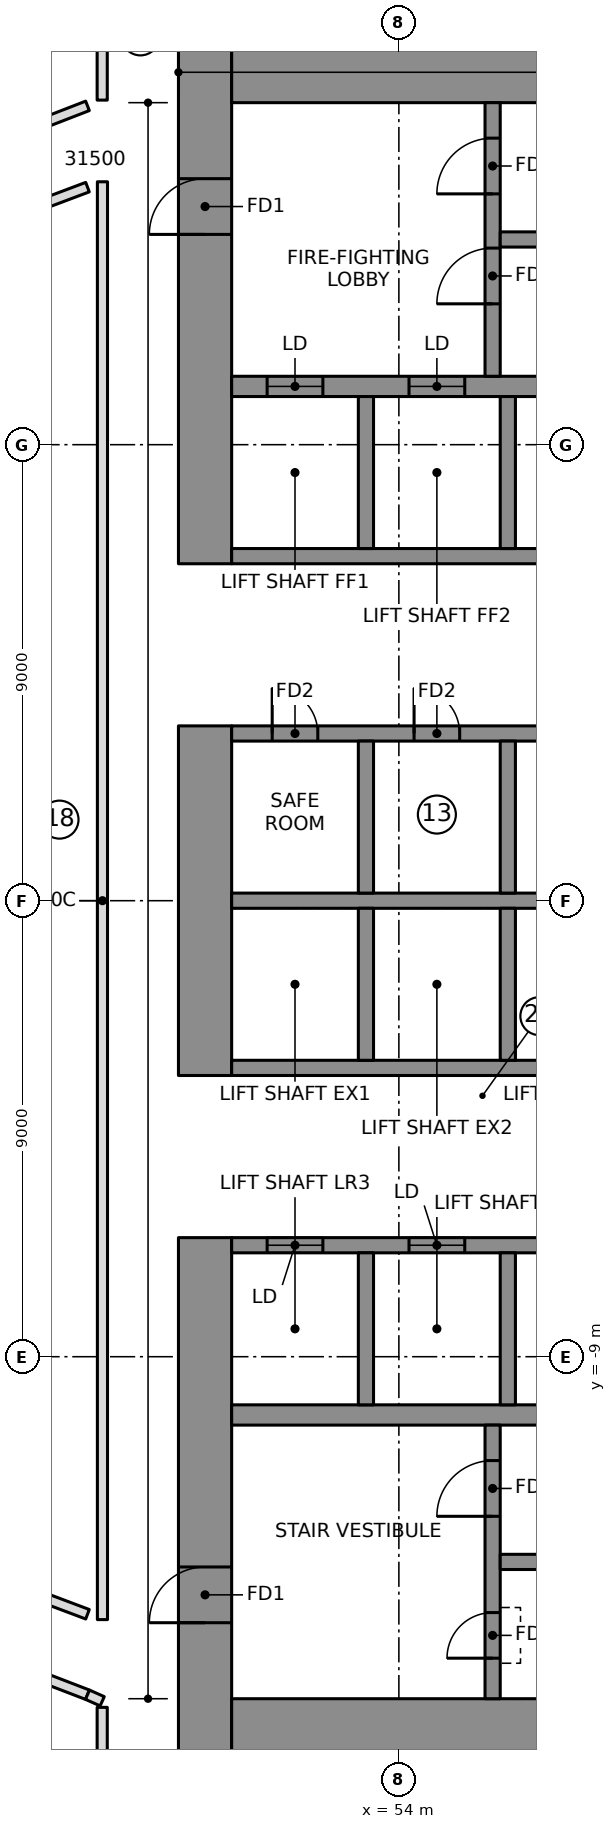
"""IFC4 building model, lengths in metres.
Left out: names, types, materials, properties, quantities, classifications, styles, units other than length and angle.
Written with IfcOpenShell. Run it as: python <this file> out.ifc"""

import sys

from ifc_helpers import new_model, si_unit, direction, frame, frame_2d, origin, place, context, subcontext, project, spatial, rectangle, extrude, element, fill, save


model = new_model("IFC4")
c1 = context("Model", 3, precision=1e-05, world=origin(), true_north=direction((0.0, 1.0)))
c2 = subcontext(c1, "Body", "Model", "MODEL_VIEW")
j1 = project(units=[si_unit("LENGTHUNIT", "METRE"), si_unit("PLANEANGLEUNIT", "RADIAN")], contexts=[c1])
p1 = place(None, origin())
s1 = spatial("IfcSite", under=j1, at=p1, CompositionType="ELEMENT")
p2 = place(p1, origin())
s2 = spatial("IfcBuilding", under=s1, at=p2, CompositionType="ELEMENT")
p3 = place(p2, frame((0.0, 0.0, 84.9)))
s3 = spatial("IfcBuildingStorey", under=s2, at=p3, CompositionType="ELEMENT", Elevation=84.9)
p4 = place(p3, frame((50.175, 6.65, 0.0), z_axis=(0.0, 0.0, 1.0), x_axis=(0.0, 1.0, 0.0)))
e1 = element("IfcWall", 1, at=p4, inside=s3, PredefinedType="SHEAR", context=c2, shape_type="SweptSolid", body=[
    extrude(rectangle(XDim=10.15, YDim=1.05, at=frame_2d((5.075, 0.0))), origin(), (0.0, 0.0, 1.0), 3.55),
])
p5 = place(p4, frame((6.5, 0.0, 0.0)))
e2 = element("IfcOpeningElement", 2, at=p5, cuts=e1, PredefinedType="OPENING", context=c2, shape_type="SweptSolid", body=[
    extrude(rectangle(XDim=1.1, YDim=2.1, at=frame_2d((0.55, 1.05))), frame((0.0, 0.535, 0.0), z_axis=(0.0, -1.0, 0.0), x_axis=(1.0, 0.0, 0.0)), (0.0, 0.0, 1.0), 1.07),
])
p6 = place(p3, frame((50.175, -3.45, 0.0), z_axis=(0.0, 0.0, 1.0), x_axis=(0.0, 1.0, 0.0)))
e3 = element("IfcWall", 3, at=p6, inside=s3, PredefinedType="SHEAR", context=c2, shape_type="SweptSolid", body=[
    extrude(rectangle(XDim=6.9, YDim=1.05, at=frame_2d((3.45, 0.0))), origin(), (0.0, 0.0, 1.0), 3.55),
])
p7 = place(p3, frame((50.175, -16.8, 0.0), z_axis=(0.0, 0.0, 1.0), x_axis=(0.0, 1.0, 0.0)))
e4 = element("IfcWall", 4, at=p7, inside=s3, PredefinedType="SHEAR", context=c2, shape_type="SweptSolid", body=[
    extrude(rectangle(XDim=10.15, YDim=1.05, at=frame_2d((5.075, 0.0))), origin(), (0.0, 0.0, 1.0), 3.55),
])
p8 = place(p7, frame((2.55, 0.0, 0.0)))
e5 = element("IfcOpeningElement", 5, at=p8, cuts=e4, PredefinedType="OPENING", context=c2, shape_type="SweptSolid", body=[
    extrude(rectangle(XDim=1.1, YDim=2.1, at=frame_2d((0.55, 1.05))), frame((0.0, 0.535, 0.0), z_axis=(0.0, -1.0, 0.0), x_axis=(1.0, 0.0, 0.0)), (0.0, 0.0, 1.0), 1.07),
])
for number, where, z_axis, x_axis in (
    (6, (50.7, 16.275, 0.0), (0.0, 0.0, 1.0), (1.0, 0.0, 0.0)),
    (7, (50.7, -16.275, 0.0), (0.0, 0.0, 1.0), (1.0, 0.0, 0.0)),
):
    element("IfcWall", number, at=place(p3, frame(where, z_axis=z_axis, x_axis=x_axis)), inside=s3, PredefinedType="SHEAR", context=c2, shape_type="SweptSolid", body=[
        extrude(rectangle(XDim=14.07, YDim=1.05, at=frame_2d((7.035, 0.0))), origin(), (0.0, 0.0, 1.0), 3.55),
    ])
p9 = place(p3, frame((50.7, 10.15, 0.0), z_axis=(0.0, 0.0, 1.0), x_axis=(1.0, 0.0, 0.0)))
e8 = element("IfcWall", 8, at=p9, inside=s3, PredefinedType="SHEAR", context=c2, shape_type="SweptSolid", body=[
    extrude(rectangle(XDim=13.02, YDim=0.4, at=frame_2d((6.51, 0.0))), origin(), (0.0, 0.0, 1.0), 3.55),
])
p10 = place(p9, frame((0.7, 0.0, 0.0)))
e9 = element("IfcOpeningElement", 9, at=p10, cuts=e8, PredefinedType="OPENING", context=c2, shape_type="SweptSolid", body=[
    extrude(rectangle(XDim=1.1, YDim=2.1, at=frame_2d((0.55, 1.05))), frame((0.0, 0.21, 0.0), z_axis=(0.0, -1.0, 0.0), x_axis=(1.0, 0.0, 0.0)), (0.0, 0.0, 1.0), 0.42),
])
p11 = place(p9, frame((3.5, 0.0, 0.0)))
e10 = element("IfcOpeningElement", 10, at=p11, cuts=e8, PredefinedType="OPENING", context=c2, shape_type="SweptSolid", body=[
    extrude(rectangle(XDim=1.1, YDim=2.1, at=frame_2d((0.55, 1.05))), frame((0.0, 0.21, 0.0), z_axis=(0.0, -1.0, 0.0), x_axis=(1.0, 0.0, 0.0)), (0.0, 0.0, 1.0), 0.42),
])
p12 = place(p3, frame((50.7, -10.15, 0.0), z_axis=(0.0, 0.0, 1.0), x_axis=(1.0, 0.0, 0.0)))
e11 = element("IfcWall", 11, at=p12, inside=s3, PredefinedType="SHEAR", context=c2, shape_type="SweptSolid", body=[
    extrude(rectangle(XDim=13.02, YDim=0.4, at=frame_2d((6.51, 0.0))), origin(), (0.0, 0.0, 1.0), 3.55),
])
p13 = place(p3, frame((50.7, 0.0, 0.0), z_axis=(0.0, 0.0, 1.0), x_axis=(1.0, 0.0, 0.0)))
e12 = element("IfcWall", 12, at=p13, inside=s3, PredefinedType="SHEAR", context=c2, shape_type="SweptSolid", body=[
    extrude(rectangle(XDim=10.9, YDim=0.3, at=frame_2d((5.45, 0.0))), origin(), (0.0, 0.0, 1.0), 3.55),
])
p14 = place(p3, frame((50.7, 3.3, 0.0), z_axis=(0.0, 0.0, 1.0), x_axis=(1.0, 0.0, 0.0)))
e13 = element("IfcWall", 13, at=p14, inside=s3, PredefinedType="SHEAR", context=c2, shape_type="SweptSolid", body=[
    extrude(rectangle(XDim=10.9, YDim=0.3, at=frame_2d((5.45, 0.0))), origin(), (0.0, 0.0, 1.0), 3.55),
])
p15 = place(p14, frame((0.8, 0.0, 0.0)))
e14 = element("IfcOpeningElement", 14, at=p15, cuts=e13, PredefinedType="OPENING", context=c2, shape_type="SweptSolid", body=[
    extrude(rectangle(XDim=0.9, YDim=2.1, at=frame_2d((0.45, 1.05))), frame((0.0, 0.16, 0.0), z_axis=(0.0, -1.0, 0.0), x_axis=(1.0, 0.0, 0.0)), (0.0, 0.0, 1.0), 0.32),
])
p16 = place(p14, frame((3.6, 0.0, 0.0)))
e15 = element("IfcOpeningElement", 15, at=p16, cuts=e13, PredefinedType="OPENING", context=c2, shape_type="SweptSolid", body=[
    extrude(rectangle(XDim=0.9, YDim=2.1, at=frame_2d((0.45, 1.05))), frame((0.0, 0.16, 0.0), z_axis=(0.0, -1.0, 0.0), x_axis=(1.0, 0.0, 0.0)), (0.0, 0.0, 1.0), 0.32),
])
p17 = place(p14, frame((6.4, 0.0, 0.0)))
e16 = element("IfcOpeningElement", 16, at=p17, cuts=e13, PredefinedType="OPENING", context=c2, shape_type="SweptSolid", body=[
    extrude(rectangle(XDim=0.9, YDim=2.1, at=frame_2d((0.45, 1.05))), frame((0.0, 0.16, 0.0), z_axis=(0.0, -1.0, 0.0), x_axis=(1.0, 0.0, 0.0)), (0.0, 0.0, 1.0), 0.32),
])
p18 = place(p14, frame((9.2, 0.0, 0.0)))
e17 = element("IfcOpeningElement", 17, at=p18, cuts=e13, PredefinedType="OPENING", context=c2, shape_type="SweptSolid", body=[
    extrude(rectangle(XDim=0.9, YDim=2.1, at=frame_2d((0.45, 1.05))), frame((0.0, 0.16, 0.0), z_axis=(0.0, -1.0, 0.0), x_axis=(1.0, 0.0, 0.0)), (0.0, 0.0, 1.0), 0.32),
])
p19 = place(p3, frame((50.7, 6.8, 0.0), z_axis=(0.0, 0.0, 1.0), x_axis=(1.0, 0.0, 0.0)))
e18 = element("IfcWall", 18, at=p19, inside=s3, PredefinedType="SHEAR", context=c2, shape_type="SweptSolid", body=[
    extrude(rectangle(XDim=10.9, YDim=0.3, at=frame_2d((5.45, 0.0))), origin(), (0.0, 0.0, 1.0), 3.55),
])
p20 = place(p19, frame((6.3, 0.0, 0.0)))
e19 = element("IfcOpeningElement", 19, at=p20, cuts=e18, PredefinedType="OPENING", context=c2, shape_type="SweptSolid", body=[
    extrude(rectangle(XDim=1.1, YDim=2.1, at=frame_2d((0.55, 1.05))), frame((0.0, 0.16, 0.0), z_axis=(0.0, -1.0, 0.0), x_axis=(1.0, 0.0, 0.0)), (0.0, 0.0, 1.0), 0.32),
])
p21 = place(p19, frame((9.1, 0.0, 0.0)))
e20 = element("IfcOpeningElement", 20, at=p21, cuts=e18, PredefinedType="OPENING", context=c2, shape_type="SweptSolid", body=[
    extrude(rectangle(XDim=1.1, YDim=2.1, at=frame_2d((0.55, 1.05))), frame((0.0, 0.16, 0.0), z_axis=(0.0, -1.0, 0.0), x_axis=(1.0, 0.0, 0.0)), (0.0, 0.0, 1.0), 0.32),
])
for number, where, z_axis, x_axis in (
    (21, (53.35, 0.15, 0.0), (0.0, 0.0, 1.0), (0.0, 1.0, 0.0)),
    (22, (53.35, 6.95, 0.0), (0.0, 0.0, 1.0), (0.0, 1.0, 0.0)),
    (23, (56.15, 0.15, 0.0), (0.0, 0.0, 1.0), (0.0, 1.0, 0.0)),
    (24, (56.15, 6.95, 0.0), (0.0, 0.0, 1.0), (0.0, 1.0, 0.0)),
):
    element("IfcWall", number, at=place(p3, frame(where, z_axis=z_axis, x_axis=x_axis)), inside=s3, PredefinedType="SHEAR", context=c2, shape_type="SweptSolid", body=[
        extrude(rectangle(XDim=3.0, YDim=0.3, at=frame_2d((1.5, 0.0))), origin(), (0.0, 0.0, 1.0), 3.55),
    ])
p22 = place(p3, frame((50.7, -3.3, 0.0), z_axis=(0.0, 0.0, 1.0), x_axis=(1.0, 0.0, 0.0)))
e25 = element("IfcWall", 25, at=p22, inside=s3, PredefinedType="SHEAR", context=c2, shape_type="SweptSolid", body=[
    extrude(rectangle(XDim=10.9, YDim=0.3, at=frame_2d((5.45, 0.0))), origin(), (0.0, 0.0, 1.0), 3.55),
])
p23 = place(p22, frame((9.2, 0.0, 0.0)))
e26 = element("IfcOpeningElement", 26, at=p23, cuts=e25, PredefinedType="OPENING", context=c2, shape_type="SweptSolid", body=[
    extrude(rectangle(XDim=0.9, YDim=2.1, at=frame_2d((0.45, 1.05))), frame((0.0, 0.16, 0.0), z_axis=(0.0, -1.0, 0.0), x_axis=(1.0, 0.0, 0.0)), (0.0, 0.0, 1.0), 0.32),
])
p24 = place(p3, frame((50.7, -6.8, 0.0), z_axis=(0.0, 0.0, 1.0), x_axis=(1.0, 0.0, 0.0)))
e27 = element("IfcWall", 27, at=p24, inside=s3, PredefinedType="SHEAR", context=c2, shape_type="SweptSolid", body=[
    extrude(rectangle(XDim=10.9, YDim=0.3, at=frame_2d((5.45, 0.0))), origin(), (0.0, 0.0, 1.0), 3.55),
])
p25 = place(p24, frame((0.7, 0.0, 0.0)))
e28 = element("IfcOpeningElement", 28, at=p25, cuts=e27, PredefinedType="OPENING", context=c2, shape_type="SweptSolid", body=[
    extrude(rectangle(XDim=1.1, YDim=2.1, at=frame_2d((0.55, 1.05))), frame((0.0, 0.16, 0.0), z_axis=(0.0, -1.0, 0.0), x_axis=(1.0, 0.0, 0.0)), (0.0, 0.0, 1.0), 0.32),
])
p26 = place(p24, frame((3.5, 0.0, 0.0)))
e29 = element("IfcOpeningElement", 29, at=p26, cuts=e27, PredefinedType="OPENING", context=c2, shape_type="SweptSolid", body=[
    extrude(rectangle(XDim=1.1, YDim=2.1, at=frame_2d((0.55, 1.05))), frame((0.0, 0.16, 0.0), z_axis=(0.0, -1.0, 0.0), x_axis=(1.0, 0.0, 0.0)), (0.0, 0.0, 1.0), 0.32),
])
p27 = place(p24, frame((6.3, 0.0, 0.0)))
e30 = element("IfcOpeningElement", 30, at=p27, cuts=e27, PredefinedType="OPENING", context=c2, shape_type="SweptSolid", body=[
    extrude(rectangle(XDim=1.1, YDim=2.1, at=frame_2d((0.55, 1.05))), frame((0.0, 0.16, 0.0), z_axis=(0.0, -1.0, 0.0), x_axis=(1.0, 0.0, 0.0)), (0.0, 0.0, 1.0), 0.32),
])
p28 = place(p24, frame((9.1, 0.0, 0.0)))
e31 = element("IfcOpeningElement", 31, at=p28, cuts=e27, PredefinedType="OPENING", context=c2, shape_type="SweptSolid", body=[
    extrude(rectangle(XDim=1.1, YDim=2.1, at=frame_2d((0.55, 1.05))), frame((0.0, 0.16, 0.0), z_axis=(0.0, -1.0, 0.0), x_axis=(1.0, 0.0, 0.0)), (0.0, 0.0, 1.0), 0.32),
])
for number, where, z_axis, x_axis in (
    (32, (53.35, -3.15, 0.0), (0.0, 0.0, 1.0), (0.0, 1.0, 0.0)),
    (33, (53.35, -9.95, 0.0), (0.0, 0.0, 1.0), (0.0, 1.0, 0.0)),
    (34, (56.15, -3.15, 0.0), (0.0, 0.0, 1.0), (0.0, 1.0, 0.0)),
    (35, (56.15, -9.95, 0.0), (0.0, 0.0, 1.0), (0.0, 1.0, 0.0)),
):
    element("IfcWall", number, at=place(p3, frame(where, z_axis=z_axis, x_axis=x_axis)), inside=s3, PredefinedType="SHEAR", context=c2, shape_type="SweptSolid", body=[
        extrude(rectangle(XDim=3.0, YDim=0.3, at=frame_2d((1.5, 0.0))), origin(), (0.0, 0.0, 1.0), 3.55),
    ])
p29 = place(p3, frame((55.85, 10.35, 0.0), z_axis=(0.0, 0.0, 1.0), x_axis=(0.0, 1.0, 0.0)))
e36 = element("IfcWall", 36, at=p29, inside=s3, PredefinedType="SHEAR", context=c2, shape_type="SweptSolid", body=[
    extrude(rectangle(XDim=5.4, YDim=0.3, at=frame_2d((2.7, 0.0))), origin(), (0.0, 0.0, 1.0), 3.55),
])
p30 = place(p29, frame((1.43, 0.0, 0.0)))
e37 = element("IfcOpeningElement", 37, at=p30, cuts=e36, PredefinedType="OPENING", context=c2, shape_type="SweptSolid", body=[
    extrude(rectangle(XDim=1.1, YDim=2.1, at=frame_2d((0.55, 1.05))), frame((0.0, 0.16, 0.0), z_axis=(0.0, -1.0, 0.0), x_axis=(1.0, 0.0, 0.0)), (0.0, 0.0, 1.0), 0.32),
])
p31 = place(p29, frame((3.6, 0.0, 0.0)))
e38 = element("IfcOpeningElement", 38, at=p31, cuts=e36, PredefinedType="OPENING", context=c2, shape_type="SweptSolid", body=[
    extrude(rectangle(XDim=1.1, YDim=2.1, at=frame_2d((0.55, 1.05))), frame((0.0, 0.16, 0.0), z_axis=(0.0, -1.0, 0.0), x_axis=(1.0, 0.0, 0.0)), (0.0, 0.0, 1.0), 0.32),
])
p32 = place(p3, frame((55.85, -15.75, 0.0), z_axis=(0.0, 0.0, 1.0), x_axis=(0.0, 1.0, 0.0)))
e39 = element("IfcWall", 39, at=p32, inside=s3, PredefinedType="SHEAR", context=c2, shape_type="SweptSolid", body=[
    extrude(rectangle(XDim=5.4, YDim=0.3, at=frame_2d((2.7, 0.0))), origin(), (0.0, 0.0, 1.0), 3.55),
])
p33 = place(p32, frame((3.6, 0.0, 0.0)))
e40 = element("IfcOpeningElement", 40, at=p33, cuts=e39, PredefinedType="OPENING", context=c2, shape_type="SweptSolid", body=[
    extrude(rectangle(XDim=1.1, YDim=2.1, at=frame_2d((0.55, 1.05))), frame((0.0, 0.16, 0.0), z_axis=(0.0, -1.0, 0.0), x_axis=(1.0, 0.0, 0.0)), (0.0, 0.0, 1.0), 0.32),
])
p34 = place(p32, frame((0.8, 0.0, 0.0)))
e41 = element("IfcOpeningElement", 41, at=p34, cuts=e39, PredefinedType="OPENING", context=c2, shape_type="SweptSolid", body=[
    extrude(rectangle(XDim=0.9, YDim=2.1, at=frame_2d((0.45, 1.05))), frame((0.0, 0.16, 0.0), z_axis=(0.0, -1.0, 0.0), x_axis=(1.0, 0.0, 0.0)), (0.0, 0.0, 1.0), 0.32),
])
for number, where, z_axis, x_axis in (
    (42, (56.0, 13.05, 0.0), (0.0, 0.0, 1.0), (1.0, 0.0, 0.0)),
    (43, (56.0, -13.05, 0.0), (0.0, 0.0, 1.0), (1.0, 0.0, 0.0)),
):
    element("IfcWall", number, at=place(p3, frame(where, z_axis=z_axis, x_axis=x_axis)), inside=s3, PredefinedType="SHEAR", context=c2, shape_type="SweptSolid", body=[
        extrude(rectangle(XDim=7.72, YDim=0.3, at=frame_2d((3.86, 0.0))), origin(), (0.0, 0.0, 1.0), 3.55),
    ])
p35 = place(p3, frame((47.855, 15.687, 0.0), z_axis=(0.0, 0.0, 1.0), x_axis=(-0.932373677254, -0.361495955668, 0.0)))
e44 = element("IfcWall", 44, at=p35, inside=s3, PredefinedType="PARTITIONING", context=c2, shape_type="SweptSolid", body=[
    extrude(rectangle(XDim=5.431, YDim=0.2, at=frame_2d((2.716, 0.0))), origin(), (0.0, 0.0, 1.0), 3.25),
])
p36 = place(p3, frame((42.791, -13.724, 0.0), z_axis=(0.0, 0.0, 1.0), x_axis=(0.933356043573, -0.358951940969, 0.0)))
e45 = element("IfcWall", 45, at=p36, inside=s3, PredefinedType="PARTITIONING", context=c2, shape_type="SweptSolid", body=[
    extrude(rectangle(XDim=5.426, YDim=0.2, at=frame_2d((2.713, 0.0))), origin(), (0.0, 0.0, 1.0), 3.25),
])
p37 = place(p36, frame((3.05, 0.0, 0.0)))
e46 = element("IfcOpeningElement", 46, at=p37, cuts=e45, PredefinedType="OPENING", context=c2, shape_type="SweptSolid", body=[
    extrude(rectangle(XDim=1.5, YDim=2.1, at=frame_2d((0.75, 1.05))), frame((0.0, 0.11, 0.0), z_axis=(0.0, -1.0, 0.0), x_axis=(1.0, 0.0, 0.0)), (0.0, 0.0, 1.0), 0.22),
])
for number, where, z_axis, x_axis in (
    (47, (46.696, 13.647, 0.0), (0.0, 0.0, 1.0), (0.936, 0.352, 0.0)),
    (48, (47.855, -14.083, 0.0), (0.0, 0.0, 1.0), (-0.936, 0.352, 0.0)),
):
    element("IfcWall", number, at=place(p3, frame(where, z_axis=z_axis, x_axis=x_axis)), inside=s3, PredefinedType="PARTITIONING", context=c2, shape_type="SweptSolid", body=[
        extrude(rectangle(XDim=1.239, YDim=0.2, at=frame_2d((0.619, 0.0))), origin(), (0.0, 0.0, 1.0), 3.25),
    ])
p38 = place(p3, frame((48.15, 14.189, 0.0), z_axis=(0.0, 0.0, 1.0), x_axis=(0.0, -1.0, 0.0)))
e49 = element("IfcWall", 49, at=p38, inside=s3, PredefinedType="PARTITIONING", context=c2, shape_type="SweptSolid", body=[
    extrude(rectangle(XDim=28.377, YDim=0.2, at=frame_2d((14.189, 0.0))), origin(), (0.0, 0.0, 1.0), 3.25),
])
p39 = place(p3, frame((48.145, 20.531, 0.0), z_axis=(0.0, 0.0, 1.0), x_axis=(5.1610239e-05, -0.999999998668, 0.0)))
e50 = element("IfcWall", 50, at=p39, inside=s3, PredefinedType="PARTITIONING", context=c2, shape_type="SweptSolid", body=[
    extrude(rectangle(XDim=4.73, YDim=0.2, at=frame_2d((2.365, 0.0))), origin(), (0.0, 0.0, 1.0), 3.25),
])
p40 = place(p39, frame((1.9, 0.0, 0.0)))
e51 = element("IfcOpeningElement", 51, at=p40, cuts=e50, PredefinedType="OPENING", context=c2, shape_type="SweptSolid", body=[
    extrude(rectangle(XDim=1.0, YDim=2.1, at=frame_2d((0.5, 1.05))), frame((0.0, 0.11, 0.0), z_axis=(0.0, -1.0, 0.0), x_axis=(1.0, 0.0, 0.0)), (0.0, 0.0, 1.0), 0.22),
])
p41 = place(p3, frame((47.855, -15.671, 0.0), z_axis=(0.0, 0.0, 1.0), x_axis=(0.91336751773, -0.407136067617, 0.0)))
e52 = element("IfcWall", 52, at=p41, inside=s3, PredefinedType="PARTITIONING", context=c2, shape_type="SweptSolid", body=[
    extrude(rectangle(XDim=0.318, YDim=0.2, at=frame_2d((0.159, 0.0))), origin(), (0.0, 0.0, 1.0), 3.25),
])
p42 = place(p3, frame((48.145, -15.92, 0.0), z_axis=(0.0, 0.0, 1.0), x_axis=(-5.1610239e-05, -0.999999998668, 0.0)))
e53 = element("IfcWall", 53, at=p42, inside=s3, PredefinedType="PARTITIONING", context=c2, shape_type="SweptSolid", body=[
    extrude(rectangle(XDim=4.73, YDim=0.2, at=frame_2d((2.365, 0.0))), origin(), (0.0, 0.0, 1.0), 3.25),
])
p43 = place(p10, origin())
e54 = element("IfcDoor", 54, at=p43, inside=s3, OperationType="DOUBLE_DOOR_SLIDING", PredefinedType="DOOR", context=c2, shape_type="SweptSolid", body=[
    extrude(rectangle(XDim=1.1, YDim=2.1, at=frame_2d((0.55, 1.05))), frame((0.0, 0.025, 0.0), z_axis=(0.0, -1.0, 0.0), x_axis=(1.0, 0.0, 0.0)), (0.0, 0.0, 1.0), 0.05),
])
fill(e9, e54)
p44 = place(p11, origin())
e55 = element("IfcDoor", 55, at=p44, inside=s3, OperationType="DOUBLE_DOOR_SLIDING", PredefinedType="DOOR", context=c2, shape_type="SweptSolid", body=[
    extrude(rectangle(XDim=1.1, YDim=2.1, at=frame_2d((0.55, 1.05))), frame((0.0, 0.025, 0.0), z_axis=(0.0, -1.0, 0.0), x_axis=(1.0, 0.0, 0.0)), (0.0, 0.0, 1.0), 0.05),
])
fill(e10, e55)
p45 = place(p25, origin())
e56 = element("IfcDoor", 56, at=p45, inside=s3, OperationType="DOUBLE_DOOR_SLIDING", PredefinedType="DOOR", context=c2, shape_type="SweptSolid", body=[
    extrude(rectangle(XDim=1.1, YDim=2.1, at=frame_2d((0.55, 1.05))), frame((0.0, 0.025, 0.0), z_axis=(0.0, -1.0, 0.0), x_axis=(1.0, 0.0, 0.0)), (0.0, 0.0, 1.0), 0.05),
])
fill(e28, e56)
p46 = place(p26, origin())
e57 = element("IfcDoor", 57, at=p46, inside=s3, OperationType="DOUBLE_DOOR_SLIDING", PredefinedType="DOOR", context=c2, shape_type="SweptSolid", body=[
    extrude(rectangle(XDim=1.1, YDim=2.1, at=frame_2d((0.55, 1.05))), frame((0.0, 0.025, 0.0), z_axis=(0.0, -1.0, 0.0), x_axis=(1.0, 0.0, 0.0)), (0.0, 0.0, 1.0), 0.05),
])
fill(e29, e57)
p47 = place(p30, origin())
e58 = element("IfcDoor", 58, at=p47, inside=s3, OperationType="SINGLE_SWING_RIGHT", PredefinedType="DOOR", context=c2, shape_type="SweptSolid", body=[
    extrude(rectangle(XDim=1.1, YDim=2.1, at=frame_2d((0.55, 1.05))), frame((0.0, 0.025, 0.0), z_axis=(0.0, -1.0, 0.0), x_axis=(1.0, 0.0, 0.0)), (0.0, 0.0, 1.0), 0.05),
])
fill(e37, e58)
p48 = place(p31, origin())
e59 = element("IfcDoor", 59, at=p48, inside=s3, OperationType="SINGLE_SWING_RIGHT", PredefinedType="DOOR", context=c2, shape_type="SweptSolid", body=[
    extrude(rectangle(XDim=1.1, YDim=2.1, at=frame_2d((0.55, 1.05))), frame((0.0, 0.025, 0.0), z_axis=(0.0, -1.0, 0.0), x_axis=(1.0, 0.0, 0.0)), (0.0, 0.0, 1.0), 0.05),
])
fill(e38, e59)
p49 = place(p33, origin())
e60 = element("IfcDoor", 60, at=p49, inside=s3, OperationType="SINGLE_SWING_RIGHT", PredefinedType="DOOR", context=c2, shape_type="SweptSolid", body=[
    extrude(rectangle(XDim=1.1, YDim=2.1, at=frame_2d((0.55, 1.05))), frame((0.0, 0.025, 0.0), z_axis=(0.0, -1.0, 0.0), x_axis=(1.0, 0.0, 0.0)), (0.0, 0.0, 1.0), 0.05),
])
fill(e40, e60)
p50 = place(p5, origin())
e61 = element("IfcDoor", 61, at=p50, inside=s3, OperationType="SINGLE_SWING_RIGHT", PredefinedType="DOOR", context=c2, shape_type="SweptSolid", body=[
    extrude(rectangle(XDim=1.1, YDim=2.1, at=frame_2d((0.55, 1.05))), frame((0.0, 0.025, 0.0), z_axis=(0.0, -1.0, 0.0), x_axis=(1.0, 0.0, 0.0)), (0.0, 0.0, 1.0), 0.05),
])
fill(e2, e61)
p51 = place(p8, origin())
e62 = element("IfcDoor", 62, at=p51, inside=s3, OperationType="SINGLE_SWING_RIGHT", PredefinedType="DOOR", context=c2, shape_type="SweptSolid", body=[
    extrude(rectangle(XDim=1.1, YDim=2.1, at=frame_2d((0.55, 1.05))), frame((0.0, 0.025, 0.0), z_axis=(0.0, -1.0, 0.0), x_axis=(1.0, 0.0, 0.0)), (0.0, 0.0, 1.0), 0.05),
])
fill(e5, e62)
p52 = place(p34, origin())
e63 = element("IfcDoor", 63, at=p52, inside=s3, OperationType="SINGLE_SWING_LEFT", PredefinedType="DOOR", context=c2, shape_type="SweptSolid", body=[
    extrude(rectangle(XDim=0.9, YDim=2.1, at=frame_2d((0.45, 1.05))), frame((0.0, 0.025, 0.0), z_axis=(0.0, -1.0, 0.0), x_axis=(1.0, 0.0, 0.0)), (0.0, 0.0, 1.0), 0.05),
])
fill(e41, e63)
p53 = place(p15, origin())
e64 = element("IfcDoor", 64, at=p53, inside=s3, OperationType="SINGLE_SWING_LEFT", PredefinedType="DOOR", context=c2, shape_type="SweptSolid", body=[
    extrude(rectangle(XDim=0.9, YDim=2.1, at=frame_2d((0.45, 1.05))), frame((0.0, 0.025, 0.0), z_axis=(0.0, -1.0, 0.0), x_axis=(1.0, 0.0, 0.0)), (0.0, 0.0, 1.0), 0.05),
])
fill(e14, e64)
p54 = place(p16, origin())
e65 = element("IfcDoor", 65, at=p54, inside=s3, OperationType="SINGLE_SWING_LEFT", PredefinedType="DOOR", context=c2, shape_type="SweptSolid", body=[
    extrude(rectangle(XDim=0.9, YDim=2.1, at=frame_2d((0.45, 1.05))), frame((0.0, 0.025, 0.0), z_axis=(0.0, -1.0, 0.0), x_axis=(1.0, 0.0, 0.0)), (0.0, 0.0, 1.0), 0.05),
])
fill(e15, e65)
save(model, sys.argv[1])
